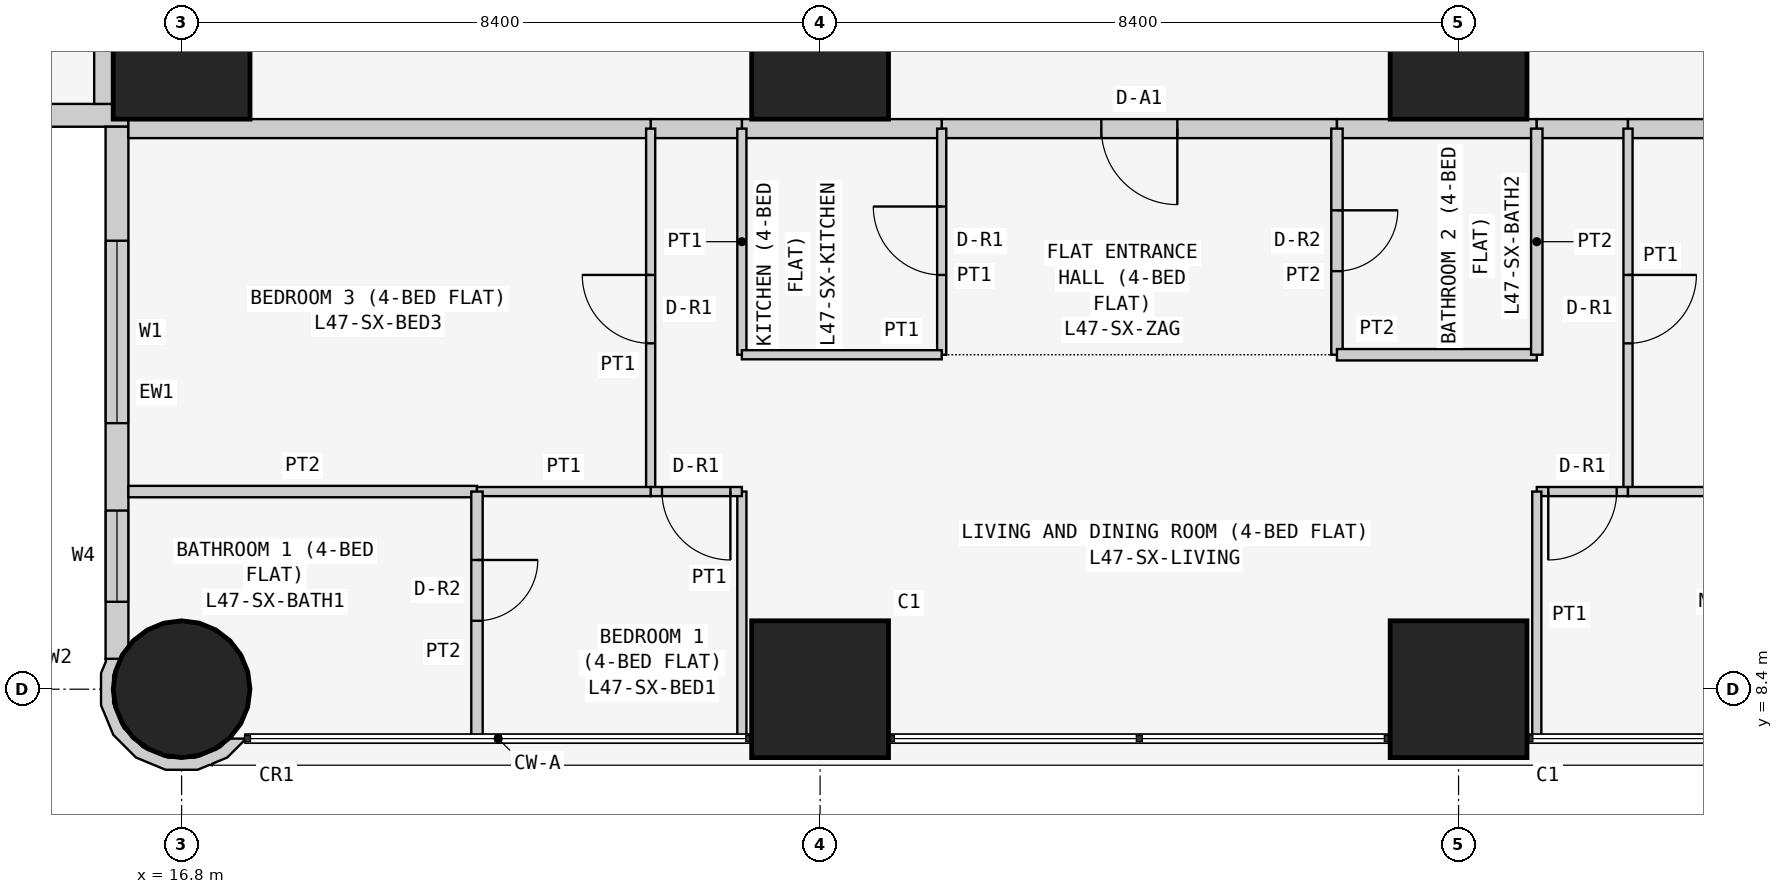
"""IFC4 building model, lengths in metres.
Left out: names, types, materials, properties, quantities, classifications, styles, units other than length and angle.
Written with IfcOpenShell. Run it as: python <this file> out.ifc"""

import sys

from ifc_helpers import new_model, si_unit, direction, frame, frame_2d, origin, origin_2d, place, context, subcontext, project, spatial, polyline, rectangle, circle, outline, extrude, element, fill, save


model = new_model("IFC4")
c1 = context("Model", 3, precision=1e-05, world=origin(), true_north=direction((0.0, 1.0)))
c2 = subcontext(c1, "Body", "Model", "MODEL_VIEW")
j1 = project(units=[si_unit("LENGTHUNIT", "METRE"), si_unit("PLANEANGLEUNIT", "RADIAN")], contexts=[c1])
p1 = place(None, origin())
s1 = spatial("IfcSite", under=j1, at=p1, CompositionType="ELEMENT")
p2 = place(p1, origin())
s2 = spatial("IfcBuilding", under=s1, at=p2, CompositionType="ELEMENT")
p3 = place(p2, frame((0.0, 0.0, 183.3)))
s3 = spatial("IfcBuildingStorey", under=s2, at=p3, CompositionType="ELEMENT", Elevation=183.3)
p4 = place(p3, frame((16.8, 8.4, 0.0), z_axis=(0.0, 0.0, 1.0), x_axis=(1.0, 0.0, 0.0)))
e1 = element("IfcColumn", 1, at=p4, inside=s3, PredefinedType="COLUMN", context=c2, shape_type="SweptSolid", body=[
    extrude(circle(Radius=0.9, at=origin_2d()), origin(), (0.0, 0.0, 1.0), 3.6),
])
for number, where, z_axis, x_axis in (
    (2, (16.8, 16.8, 0.0), (0.0, 0.0, 1.0), (1.0, 0.0, 0.0)),
    (3, (25.2, 8.4, 0.0), (0.0, 0.0, 1.0), (1.0, 0.0, 0.0)),
    (4, (25.2, 16.8, 0.0), (0.0, 0.0, 1.0), (1.0, 0.0, 0.0)),
    (5, (33.6, 8.4, 0.0), (0.0, 0.0, 1.0), (1.0, 0.0, 0.0)),
    (6, (33.6, 16.8, 0.0), (0.0, 0.0, 1.0), (1.0, 0.0, 0.0)),
):
    element("IfcColumn", number, at=place(p3, frame(where, z_axis=z_axis, x_axis=x_axis)), inside=s3, PredefinedType="COLUMN", context=c2, shape_type="SweptSolid", body=[
        extrude(rectangle(XDim=1.8, YDim=1.8, at=origin_2d()), origin(), (0.0, 0.0, 1.0), 3.6),
    ])
p5 = place(p3, frame((0.4, 15.95, 0.0), z_axis=(0.0, 0.0, 1.0), x_axis=(1.0, 0.0, 0.0)))
e7 = element("IfcWall", 7, at=p5, inside=s3, PredefinedType="SOLIDWALL", context=c2, shape_type="SweptSolid", body=[
    extrude(rectangle(XDim=15.7, YDim=0.3, at=frame_2d((7.85, 0.0))), origin(), (0.0, 0.0, 1.0), 3.45),
])
p6 = place(p5, frame((12.4, 0.0, 0.9)))
e8 = element("IfcOpeningElement", 8, at=p6, cuts=e7, PredefinedType="OPENING", context=c2, shape_type="SweptSolid", body=[
    extrude(rectangle(XDim=1.8, YDim=1.5, at=frame_2d((0.9, 0.75))), frame((0.0, 0.16, 0.0), z_axis=(0.0, -1.0, 0.0), x_axis=(1.0, 0.0, 0.0)), (0.0, 0.0, 1.0), 0.32),
])
p7 = place(p5, frame((9.55, 0.0, 1.5)))
e9 = element("IfcOpeningElement", 9, at=p7, cuts=e7, PredefinedType="OPENING", context=c2, shape_type="SweptSolid", body=[
    extrude(rectangle(XDim=0.9, YDim=0.7, at=frame_2d((0.45, 0.35))), frame((0.0, 0.16, 0.0), z_axis=(0.0, -1.0, 0.0), x_axis=(1.0, 0.0, 0.0)), (0.0, 0.0, 1.0), 0.32),
])
p8 = place(p5, frame((5.1, 0.0, 0.9)))
e10 = element("IfcOpeningElement", 10, at=p8, cuts=e7, PredefinedType="OPENING", context=c2, shape_type="SweptSolid", body=[
    extrude(rectangle(XDim=1.8, YDim=1.5, at=frame_2d((0.9, 0.75))), frame((0.0, 0.16, 0.0), z_axis=(0.0, -1.0, 0.0), x_axis=(1.0, 0.0, 0.0)), (0.0, 0.0, 1.0), 0.32),
])
p9 = place(p5, frame((2.0, 0.0, 0.0)))
e11 = element("IfcOpeningElement", 11, at=p9, cuts=e7, PredefinedType="OPENING", context=c2, shape_type="SweptSolid", body=[
    extrude(rectangle(XDim=0.9, YDim=2.4, at=frame_2d((0.45, 1.2))), frame((0.0, 0.16, 0.0), z_axis=(0.0, -1.0, 0.0), x_axis=(1.0, 0.0, 0.0)), (0.0, 0.0, 1.0), 0.32),
])
p10 = place(p5, frame((0.7, 0.0, 0.9)))
e12 = element("IfcOpeningElement", 12, at=p10, cuts=e7, PredefinedType="OPENING", context=c2, shape_type="SweptSolid", body=[
    extrude(rectangle(XDim=1.2, YDim=1.5, at=frame_2d((0.6, 0.75))), frame((0.0, 0.16, 0.0), z_axis=(0.0, -1.0, 0.0), x_axis=(1.0, 0.0, 0.0)), (0.0, 0.0, 1.0), 0.32),
])
p11 = place(p3, frame((15.95, 15.8, 0.0), z_axis=(0.0, 0.0, 1.0), x_axis=(0.0, -1.0, 0.0)))
e13 = element("IfcWall", 13, at=p11, inside=s3, PredefinedType="SOLIDWALL", context=c2, shape_type="SweptSolid", body=[
    extrude(rectangle(XDim=7.0, YDim=0.3, at=frame_2d((3.5, 0.0))), origin(), (0.0, 0.0, 1.0), 3.45),
])
p12 = place(p11, frame((1.5, 0.0, 0.9)))
e14 = element("IfcOpeningElement", 14, at=p12, cuts=e13, PredefinedType="OPENING", context=c2, shape_type="SweptSolid", body=[
    extrude(rectangle(XDim=2.4, YDim=1.5, at=frame_2d((1.2, 0.75))), frame((0.0, 0.16, 0.0), z_axis=(0.0, -1.0, 0.0), x_axis=(1.0, 0.0, 0.0)), (0.0, 0.0, 1.0), 0.32),
])
p13 = place(p11, frame((5.05, 0.0, 0.9)))
e15 = element("IfcOpeningElement", 15, at=p13, cuts=e13, PredefinedType="OPENING", context=c2, shape_type="SweptSolid", body=[
    extrude(rectangle(XDim=1.2, YDim=1.5, at=frame_2d((0.6, 0.75))), frame((0.0, 0.16, 0.0), z_axis=(0.0, -1.0, 0.0), x_axis=(1.0, 0.0, 0.0)), (0.0, 0.0, 1.0), 0.32),
])
p14 = place(p3, frame((15.89, 8.764, 0.0), z_axis=(0.0, 0.0, 1.0), x_axis=(-0.377204953059, -0.926129809145, 0.0)))
e16 = element("IfcWall", 16, at=p14, inside=s3, PredefinedType="SOLIDWALL", context=c2, shape_type="SweptSolid", body=[
    extrude(outline(polyline([(0.36, 1.803), (0.509, 1.741), (0.761, 1.486), (0.896, 1.154), (0.894, 0.795), (0.755, 0.465), (0.5, 0.213), (0.168, 0.078), (-0.1, 0.08), (0.001, -0.097), (0.03, -0.08), (0.198, -0.081), (0.589, 0.078), (0.889, 0.374), (1.052, 0.763), (1.055, 1.184), (0.896, 1.575), (0.778, 1.695), (0.769, 1.728), (0.75, 1.723), (0.6, 1.875), (0.295, 2.004), (0.281, 1.998), (0.36, 1.803)])), origin(), (0.0, 0.0, 1.0), 3.45),
])
p15 = place(p3, frame((32.0, 15.775, 0.0), z_axis=(0.0, 0.0, 1.0), x_axis=(-1.0, 0.0, 0.0)))
e17 = element("IfcWall", 17, at=p15, inside=s3, PredefinedType="PARTITIONING", context=c2, shape_type="SweptSolid", body=[
    extrude(rectangle(XDim=5.2, YDim=0.25, at=frame_2d((2.6, 0.0))), origin(), (0.0, 0.0, 1.0), 3.45),
])
p16 = place(p15, frame((2.1, 0.0, 0.0)))
e18 = element("IfcOpeningElement", 18, at=p16, cuts=e17, PredefinedType="OPENING", context=c2, shape_type="SweptSolid", body=[
    extrude(rectangle(XDim=1.0, YDim=2.1, at=frame_2d((0.5, 1.05))), frame((0.0, 0.135, 0.0), z_axis=(0.0, -1.0, 0.0), x_axis=(1.0, 0.0, 0.0)), (0.0, 0.0, 1.0), 0.27),
])
p17 = place(p3, frame((34.629, 15.775, 0.0), z_axis=(0.0, 0.0, 1.0), x_axis=(-1.0, 0.0, 0.0)))
e19 = element("IfcWall", 19, at=p17, inside=s3, PredefinedType="PARTITIONING", context=c2, shape_type="SweptSolid", body=[
    extrude(rectangle(XDim=2.629, YDim=0.25, at=frame_2d((1.314, 0.0))), origin(), (0.0, 0.0, 1.0), 3.45),
])
p18 = place(p3, frame((26.8, 15.775, 0.0), z_axis=(0.0, 0.0, 1.0), x_axis=(-1.0, 0.0, 0.0)))
e20 = element("IfcWall", 20, at=p18, inside=s3, PredefinedType="PARTITIONING", context=c2, shape_type="SweptSolid", body=[
    extrude(rectangle(XDim=2.629, YDim=0.25, at=frame_2d((1.314, 0.0))), origin(), (0.0, 0.0, 1.0), 3.45),
])
p19 = place(p3, frame((24.171, 15.775, 0.0), z_axis=(0.0, 0.0, 1.0), x_axis=(-1.0, 0.0, 0.0)))
e21 = element("IfcWall", 21, at=p19, inside=s3, PredefinedType="PARTITIONING", context=c2, shape_type="SweptSolid", body=[
    extrude(rectangle(XDim=1.2, YDim=0.25, at=frame_2d((0.6, 0.0))), origin(), (0.0, 0.0, 1.0), 3.45),
])
p20 = place(p3, frame((35.829, 15.775, 0.0), z_axis=(0.0, 0.0, 1.0), x_axis=(-1.0, 0.0, 0.0)))
e22 = element("IfcWall", 22, at=p20, inside=s3, PredefinedType="PARTITIONING", context=c2, shape_type="SweptSolid", body=[
    extrude(rectangle(XDim=1.2, YDim=0.25, at=frame_2d((0.6, 0.0))), origin(), (0.0, 0.0, 1.0), 3.45),
])
for number, where, z_axis, x_axis in (
    (23, (42.7, 15.775, 0.0), (0.0, 0.0, 1.0), (-1.0, 0.0, 0.0)),
    (24, (22.971, 15.775, 0.0), (0.0, 0.0, 1.0), (-1.0, 0.0, 0.0)),
    (25, (15.775, 16.1, 0.0), (0.0, 0.0, 1.0), (0.0, 1.0, 0.0)),
):
    element("IfcWall", number, at=place(p3, frame(where, z_axis=z_axis, x_axis=x_axis)), inside=s3, PredefinedType="PARTITIONING", context=c2, shape_type="SweptSolid", body=[
        extrude(rectangle(XDim=6.871, YDim=0.25, at=frame_2d((3.436, 0.0))), origin(), (0.0, 0.0, 1.0), 3.45),
    ])
p21 = place(p3, frame((32.0, 12.8, 0.0), z_axis=(0.0, 0.0, 1.0), x_axis=(0.0, 1.0, 0.0)))
e26 = element("IfcWall", 26, at=p21, inside=s3, PredefinedType="PARTITIONING", context=c2, shape_type="SweptSolid", body=[
    extrude(rectangle(XDim=2.975, YDim=0.15, at=frame_2d((1.487, 0.0))), origin(), (0.0, 0.0, 1.0), 3.45),
])
p22 = place(p21, frame((1.1, 0.0, 0.0)))
e27 = element("IfcOpeningElement", 27, at=p22, cuts=e26, PredefinedType="OPENING", context=c2, shape_type="SweptSolid", body=[
    extrude(rectangle(XDim=0.8, YDim=2.1, at=frame_2d((0.4, 1.05))), frame((0.0, 0.085, 0.0), z_axis=(0.0, -1.0, 0.0), x_axis=(1.0, 0.0, 0.0)), (0.0, 0.0, 1.0), 0.17),
])
p23 = place(p3, frame((26.8, 15.775, 0.0), z_axis=(0.0, 0.0, 1.0), x_axis=(0.0, -1.0, 0.0)))
e28 = element("IfcWall", 28, at=p23, inside=s3, PredefinedType="PARTITIONING", context=c2, shape_type="SweptSolid", body=[
    extrude(rectangle(XDim=2.975, YDim=0.12, at=frame_2d((1.487, 0.0))), origin(), (0.0, 0.0, 1.0), 3.45),
])
p24 = place(p23, frame((1.025, 0.0, 0.0)))
e29 = element("IfcOpeningElement", 29, at=p24, cuts=e28, PredefinedType="OPENING", context=c2, shape_type="SweptSolid", body=[
    extrude(rectangle(XDim=0.9, YDim=2.1, at=frame_2d((0.45, 1.05))), frame((0.0, 0.07, 0.0), z_axis=(0.0, -1.0, 0.0), x_axis=(1.0, 0.0, 0.0)), (0.0, 0.0, 1.0), 0.14),
])
p25 = place(p3, frame((32.0, 12.8, 0.0), z_axis=(0.0, 0.0, 1.0), x_axis=(1.0, 0.0, 0.0)))
e30 = element("IfcWall", 30, at=p25, inside=s3, PredefinedType="PARTITIONING", context=c2, shape_type="SweptSolid", body=[
    extrude(rectangle(XDim=2.629, YDim=0.15, at=frame_2d((1.314, 0.0))), origin(), (0.0, 0.0, 1.0), 3.45),
])
p26 = place(p3, frame((34.629, 12.8, 0.0), z_axis=(0.0, 0.0, 1.0), x_axis=(0.0, 1.0, 0.0)))
e31 = element("IfcWall", 31, at=p26, inside=s3, PredefinedType="PARTITIONING", context=c2, shape_type="SweptSolid", body=[
    extrude(rectangle(XDim=2.975, YDim=0.15, at=frame_2d((1.487, 0.0))), origin(), (0.0, 0.0, 1.0), 3.45),
])
p27 = place(p3, frame((24.171, 15.775, 0.0), z_axis=(0.0, 0.0, 1.0), x_axis=(0.0, -1.0, 0.0)))
e32 = element("IfcWall", 32, at=p27, inside=s3, PredefinedType="PARTITIONING", context=c2, shape_type="SweptSolid", body=[
    extrude(rectangle(XDim=2.975, YDim=0.12, at=frame_2d((1.487, 0.0))), origin(), (0.0, 0.0, 1.0), 3.45),
])
p28 = place(p3, frame((24.171, 12.8, 0.0), z_axis=(0.0, 0.0, 1.0), x_axis=(1.0, 0.0, 0.0)))
e33 = element("IfcWall", 33, at=p28, inside=s3, PredefinedType="PARTITIONING", context=c2, shape_type="SweptSolid", body=[
    extrude(rectangle(XDim=2.629, YDim=0.12, at=frame_2d((1.314, 0.0))), origin(), (0.0, 0.0, 1.0), 3.45),
])
p29 = place(p3, frame((35.829, 15.775, 0.0), z_axis=(0.0, 0.0, 1.0), x_axis=(0.0, -1.0, 0.0)))
e34 = element("IfcWall", 34, at=p29, inside=s3, PredefinedType="PARTITIONING", context=c2, shape_type="SweptSolid", body=[
    extrude(rectangle(XDim=4.775, YDim=0.12, at=frame_2d((2.387, 0.0))), origin(), (0.0, 0.0, 1.0), 3.45),
])
p30 = place(p29, frame((1.925, 0.0, 0.0)))
e35 = element("IfcOpeningElement", 35, at=p30, cuts=e34, PredefinedType="OPENING", context=c2, shape_type="SweptSolid", body=[
    extrude(rectangle(XDim=0.9, YDim=2.1, at=frame_2d((0.45, 1.05))), frame((0.0, 0.07, 0.0), z_axis=(0.0, -1.0, 0.0), x_axis=(1.0, 0.0, 0.0)), (0.0, 0.0, 1.0), 0.14),
])
p31 = place(p3, frame((35.829, 11.0, 0.0), z_axis=(0.0, 0.0, 1.0), x_axis=(-1.0, 0.0, 0.0)))
e36 = element("IfcWall", 36, at=p31, inside=s3, PredefinedType="PARTITIONING", context=c2, shape_type="SweptSolid", body=[
    extrude(rectangle(XDim=1.2, YDim=0.12, at=frame_2d((0.6, 0.0))), origin(), (0.0, 0.0, 1.0), 3.45),
])
p32 = place(p31, frame((0.149, 0.0, 0.0)))
e37 = element("IfcOpeningElement", 37, at=p32, cuts=e36, PredefinedType="OPENING", context=c2, shape_type="SweptSolid", body=[
    extrude(rectangle(XDim=0.9, YDim=2.1, at=frame_2d((0.45, 1.05))), frame((0.0, 0.07, 0.0), z_axis=(0.0, -1.0, 0.0), x_axis=(1.0, 0.0, 0.0)), (0.0, 0.0, 1.0), 0.14),
])
p33 = place(p3, frame((34.629, 11.0, 0.0), z_axis=(0.0, 0.0, 1.0), x_axis=(0.0, -1.0, 0.0)))
e38 = element("IfcWall", 38, at=p33, inside=s3, PredefinedType="PARTITIONING", context=c2, shape_type="SweptSolid", body=[
    extrude(rectangle(XDim=3.25, YDim=0.12, at=frame_2d((1.625, 0.0))), origin(), (0.0, 0.0, 1.0), 3.45),
])
p34 = place(p3, frame((22.971, 11.0, 0.0), z_axis=(0.0, 0.0, 1.0), x_axis=(0.0, 1.0, 0.0)))
e39 = element("IfcWall", 39, at=p34, inside=s3, PredefinedType="PARTITIONING", context=c2, shape_type="SweptSolid", body=[
    extrude(rectangle(XDim=4.775, YDim=0.12, at=frame_2d((2.387, 0.0))), origin(), (0.0, 0.0, 1.0), 3.45),
])
p35 = place(p34, frame((1.95, 0.0, 0.0)))
e40 = element("IfcOpeningElement", 40, at=p35, cuts=e39, PredefinedType="OPENING", context=c2, shape_type="SweptSolid", body=[
    extrude(rectangle(XDim=0.9, YDim=2.1, at=frame_2d((0.45, 1.05))), frame((0.0, 0.07, 0.0), z_axis=(0.0, -1.0, 0.0), x_axis=(1.0, 0.0, 0.0)), (0.0, 0.0, 1.0), 0.14),
])
p36 = place(p3, frame((24.171, 7.75, 0.0), z_axis=(0.0, 0.0, 1.0), x_axis=(0.0, 1.0, 0.0)))
e41 = element("IfcWall", 41, at=p36, inside=s3, PredefinedType="PARTITIONING", context=c2, shape_type="SweptSolid", body=[
    extrude(rectangle(XDim=3.25, YDim=0.12, at=frame_2d((1.625, 0.0))), origin(), (0.0, 0.0, 1.0), 3.45),
])
p37 = place(p3, frame((24.171, 11.0, 0.0), z_axis=(0.0, 0.0, 1.0), x_axis=(-1.0, 0.0, 0.0)))
e42 = element("IfcWall", 42, at=p37, inside=s3, PredefinedType="PARTITIONING", context=c2, shape_type="SweptSolid", body=[
    extrude(rectangle(XDim=1.2, YDim=0.12, at=frame_2d((0.6, 0.0))), origin(), (0.0, 0.0, 1.0), 3.45),
])
p38 = place(p37, frame((0.151, 0.0, 0.0)))
e43 = element("IfcOpeningElement", 43, at=p38, cuts=e42, PredefinedType="OPENING", context=c2, shape_type="SweptSolid", body=[
    extrude(rectangle(XDim=0.9, YDim=2.1, at=frame_2d((0.45, 1.05))), frame((0.0, 0.07, 0.0), z_axis=(0.0, -1.0, 0.0), x_axis=(1.0, 0.0, 0.0)), (0.0, 0.0, 1.0), 0.14),
])
p39 = place(p3, frame((35.829, 11.0, 0.0), z_axis=(0.0, 0.0, 1.0), x_axis=(1.0, 0.0, 0.0)))
e44 = element("IfcWall", 44, at=p39, inside=s3, PredefinedType="PARTITIONING", context=c2, shape_type="SweptSolid", body=[
    extrude(rectangle(XDim=6.871, YDim=0.12, at=frame_2d((3.436, 0.0))), origin(), (0.0, 0.0, 1.0), 3.45),
])
p40 = place(p3, frame((16.1, 11.0, 0.0), z_axis=(0.0, 0.0, 1.0), x_axis=(1.0, 0.0, 0.0)))
e45 = element("IfcWall", 45, at=p40, inside=s3, PredefinedType="PARTITIONING", context=c2, shape_type="SweptSolid", body=[
    extrude(rectangle(XDim=4.586, YDim=0.15, at=frame_2d((2.293, 0.0))), origin(), (0.0, 0.0, 1.0), 3.45),
])
p41 = place(p3, frame((20.686, 11.0, 0.0), z_axis=(0.0, 0.0, 1.0), x_axis=(1.0, 0.0, 0.0)))
e46 = element("IfcWall", 46, at=p41, inside=s3, PredefinedType="PARTITIONING", context=c2, shape_type="SweptSolid", body=[
    extrude(rectangle(XDim=2.285, YDim=0.12, at=frame_2d((1.143, 0.0))), origin(), (0.0, 0.0, 1.0), 3.45),
])
p42 = place(p3, frame((20.686, 7.75, 0.0), z_axis=(0.0, 0.0, 1.0), x_axis=(0.0, 1.0, 0.0)))
e47 = element("IfcWall", 47, at=p42, inside=s3, PredefinedType="PARTITIONING", context=c2, shape_type="SweptSolid", body=[
    extrude(rectangle(XDim=3.25, YDim=0.15, at=frame_2d((1.625, 0.0))), origin(), (0.0, 0.0, 1.0), 3.45),
])
p43 = place(p42, frame((1.55, 0.0, 0.0)))
e48 = element("IfcOpeningElement", 48, at=p43, cuts=e47, PredefinedType="OPENING", context=c2, shape_type="SweptSolid", body=[
    extrude(rectangle(XDim=0.8, YDim=2.1, at=frame_2d((0.4, 1.05))), frame((0.0, 0.085, 0.0), z_axis=(0.0, -1.0, 0.0), x_axis=(1.0, 0.0, 0.0)), (0.0, 0.0, 1.0), 0.17),
])
p44 = place(p12, origin())
e49 = element("IfcWindow", 49, at=p44, inside=s3, PartitioningType="SINGLE_PANEL", PredefinedType="WINDOW", context=c2, shape_type="SweptSolid", body=[
    extrude(rectangle(XDim=2.4, YDim=1.5, at=frame_2d((1.2, 0.75))), frame((0.0, 0.03, 0.0), z_axis=(0.0, -1.0, 0.0), x_axis=(1.0, 0.0, 0.0)), (0.0, 0.0, 1.0), 0.06),
])
fill(e14, e49)
p45 = place(p13, origin())
e50 = element("IfcWindow", 50, at=p45, inside=s3, PartitioningType="SINGLE_PANEL", PredefinedType="WINDOW", context=c2, shape_type="SweptSolid", body=[
    extrude(rectangle(XDim=1.2, YDim=1.5, at=frame_2d((0.6, 0.75))), frame((0.0, 0.03, 0.0), z_axis=(0.0, -1.0, 0.0), x_axis=(1.0, 0.0, 0.0)), (0.0, 0.0, 1.0), 0.06),
])
fill(e15, e50)
p46 = place(p16, origin())
e51 = element("IfcDoor", 51, at=p46, inside=s3, OperationType="SINGLE_SWING_LEFT", PredefinedType="DOOR", context=c2, shape_type="SweptSolid", body=[
    extrude(rectangle(XDim=1.0, YDim=2.1, at=frame_2d((0.5, 1.05))), frame((0.0, 0.025, 0.0), z_axis=(0.0, -1.0, 0.0), x_axis=(1.0, 0.0, 0.0)), (0.0, 0.0, 1.0), 0.05),
])
fill(e18, e51)
p47 = place(p22, frame((0.8, 0.0, 0.0), z_axis=(0.0, 0.0, 1.0), x_axis=(-1.0, 0.0, 0.0)))
e52 = element("IfcDoor", 52, at=p47, inside=s3, OperationType="SINGLE_SWING_LEFT", PredefinedType="DOOR", context=c2, shape_type="SweptSolid", body=[
    extrude(rectangle(XDim=0.8, YDim=2.1, at=frame_2d((0.4, 1.05))), frame((0.0, 0.025, 0.0), z_axis=(0.0, -1.0, 0.0), x_axis=(1.0, 0.0, 0.0)), (0.0, 0.0, 1.0), 0.05),
])
fill(e27, e52)
p48 = place(p24, frame((0.9, 0.0, 0.0), z_axis=(0.0, 0.0, 1.0), x_axis=(-1.0, 0.0, 0.0)))
e53 = element("IfcDoor", 53, at=p48, inside=s3, OperationType="SINGLE_SWING_RIGHT", PredefinedType="DOOR", context=c2, shape_type="SweptSolid", body=[
    extrude(rectangle(XDim=0.9, YDim=2.1, at=frame_2d((0.45, 1.05))), frame((0.0, 0.025, 0.0), z_axis=(0.0, -1.0, 0.0), x_axis=(1.0, 0.0, 0.0)), (0.0, 0.0, 1.0), 0.05),
])
fill(e29, e53)
p49 = place(p30, origin())
e54 = element("IfcDoor", 54, at=p49, inside=s3, OperationType="SINGLE_SWING_LEFT", PredefinedType="DOOR", context=c2, shape_type="SweptSolid", body=[
    extrude(rectangle(XDim=0.9, YDim=2.1, at=frame_2d((0.45, 1.05))), frame((0.0, 0.025, 0.0), z_axis=(0.0, -1.0, 0.0), x_axis=(1.0, 0.0, 0.0)), (0.0, 0.0, 1.0), 0.05),
])
fill(e35, e54)
p50 = place(p32, origin())
e55 = element("IfcDoor", 55, at=p50, inside=s3, OperationType="SINGLE_SWING_RIGHT", PredefinedType="DOOR", context=c2, shape_type="SweptSolid", body=[
    extrude(rectangle(XDim=0.9, YDim=2.1, at=frame_2d((0.45, 1.05))), frame((0.0, 0.025, 0.0), z_axis=(0.0, -1.0, 0.0), x_axis=(1.0, 0.0, 0.0)), (0.0, 0.0, 1.0), 0.05),
])
fill(e37, e55)
p51 = place(p35, origin())
e56 = element("IfcDoor", 56, at=p51, inside=s3, OperationType="SINGLE_SWING_RIGHT", PredefinedType="DOOR", context=c2, shape_type="SweptSolid", body=[
    extrude(rectangle(XDim=0.9, YDim=2.1, at=frame_2d((0.45, 1.05))), frame((0.0, 0.025, 0.0), z_axis=(0.0, -1.0, 0.0), x_axis=(1.0, 0.0, 0.0)), (0.0, 0.0, 1.0), 0.05),
])
fill(e40, e56)
p52 = place(p38, origin())
e57 = element("IfcDoor", 57, at=p52, inside=s3, OperationType="SINGLE_SWING_LEFT", PredefinedType="DOOR", context=c2, shape_type="SweptSolid", body=[
    extrude(rectangle(XDim=0.9, YDim=2.1, at=frame_2d((0.45, 1.05))), frame((0.0, 0.025, 0.0), z_axis=(0.0, -1.0, 0.0), x_axis=(1.0, 0.0, 0.0)), (0.0, 0.0, 1.0), 0.05),
])
fill(e43, e57)
p53 = place(p43, frame((0.8, 0.0, 0.0), z_axis=(0.0, 0.0, 1.0), x_axis=(-1.0, 0.0, 0.0)))
e58 = element("IfcDoor", 58, at=p53, inside=s3, OperationType="SINGLE_SWING_LEFT", PredefinedType="DOOR", context=c2, shape_type="SweptSolid", body=[
    extrude(rectangle(XDim=0.8, YDim=2.1, at=frame_2d((0.4, 1.05))), frame((0.0, 0.025, 0.0), z_axis=(0.0, -1.0, 0.0), x_axis=(1.0, 0.0, 0.0)), (0.0, 0.0, 1.0), 0.05),
])
fill(e48, e58)
save(model, sys.argv[1])
